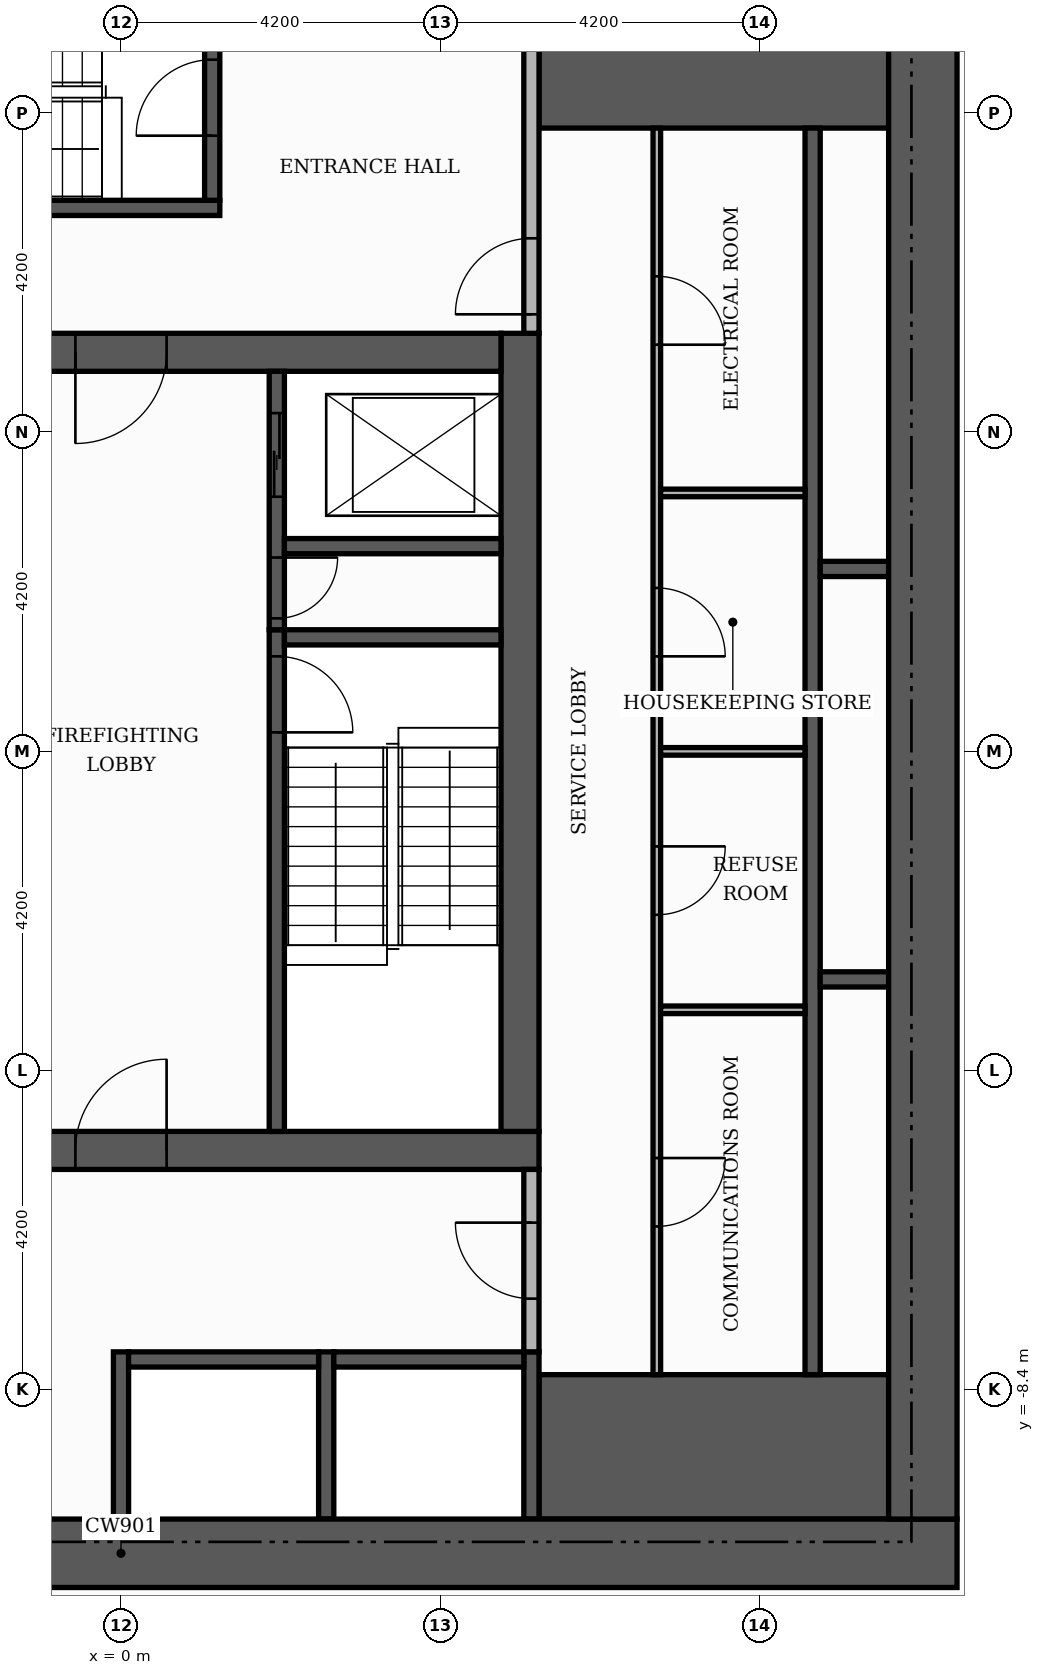
"""IFC4 building model, lengths in metres.
Left out: names, types, materials, properties, quantities, classifications, styles, units other than length and angle.
Written with IfcOpenShell. Run it as: python <this file> out.ifc"""

import sys

from ifc_helpers import new_model, si_unit, direction, frame, frame_2d, origin, place, context, subcontext, project, spatial, rectangle, extrude, element, fill, save


model = new_model("IFC4")
c1 = context("Model", 3, precision=1e-05, world=origin(), true_north=direction((0.0, 1.0)))
c2 = subcontext(c1, "Body", "Model", "MODEL_VIEW")
j1 = project(units=[si_unit("LENGTHUNIT", "METRE"), si_unit("PLANEANGLEUNIT", "RADIAN")], contexts=[c1])
p1 = place(None, origin())
s1 = spatial("IfcSite", under=j1, at=p1, CompositionType="ELEMENT")
p2 = place(p1, origin())
s2 = spatial("IfcBuilding", under=s1, at=p2, CompositionType="ELEMENT")
p3 = place(p2, frame((0.0, 0.0, 66.0)))
s3 = spatial("IfcBuildingStorey", under=s2, at=p3, CompositionType="ELEMENT", Elevation=66.0)
p4 = place(p3, frame((-5.5, -5.25, 0.0), z_axis=(0.0, 0.0, 1.0), x_axis=(1.0, 0.0, 0.0)))
e1 = element("IfcWall", 1, at=p4, inside=s3, PredefinedType="SHEAR", context=c2, shape_type="SweptSolid", body=[
    extrude(rectangle(XDim=11.0, YDim=0.5, at=frame_2d((5.5, 0.0))), origin(), (0.0, 0.0, 1.0), 3.48),
])
p5 = place(p4, frame((4.9, 0.0, 0.0)))
e2 = element("IfcOpeningElement", 2, at=p5, cuts=e1, PredefinedType="OPENING", context=c2, shape_type="SweptSolid", body=[
    extrude(rectangle(XDim=1.2, YDim=2.1, at=frame_2d((0.6, 1.05))), frame((0.0, 0.26, 0.0), z_axis=(0.0, -1.0, 0.0), x_axis=(1.0, 0.0, 0.0)), (0.0, 0.0, 1.0), 0.52),
])
p6 = place(p3, frame((5.25, -5.0, 0.0), z_axis=(0.0, 0.0, 1.0), x_axis=(0.0, 1.0, 0.0)))
e3 = element("IfcWall", 3, at=p6, inside=s3, PredefinedType="SHEAR", context=c2, shape_type="SweptSolid", body=[
    extrude(rectangle(XDim=10.5, YDim=0.5, at=frame_2d((5.25, 0.0))), origin(), (0.0, 0.0, 1.0), 3.48),
])
p7 = place(p3, frame((-5.0, 5.25, 0.0), z_axis=(0.0, 0.0, 1.0), x_axis=(1.0, 0.0, 0.0)))
e4 = element("IfcWall", 4, at=p7, inside=s3, PredefinedType="SHEAR", context=c2, shape_type="SweptSolid", body=[
    extrude(rectangle(XDim=10.0, YDim=0.5, at=frame_2d((5.0, 0.0))), origin(), (0.0, 0.0, 1.0), 3.48),
])
p8 = place(p7, frame((4.4, 0.0, 0.0)))
e5 = element("IfcOpeningElement", 5, at=p8, cuts=e4, PredefinedType="OPENING", context=c2, shape_type="SweptSolid", body=[
    extrude(rectangle(XDim=1.2, YDim=2.1, at=frame_2d((0.6, 1.05))), frame((0.0, 0.26, 0.0), z_axis=(0.0, -1.0, 0.0), x_axis=(1.0, 0.0, 0.0)), (0.0, 0.0, 1.0), 0.52),
])
for number, where, z_axis, x_axis in (
    (6, (5.5, -9.15, 0.0), (0.0, 0.0, 1.0), (1.0, 0.0, 0.0)),
    (7, (5.5, 9.15, 0.0), (0.0, 0.0, 1.0), (1.0, 0.0, 0.0)),
):
    element("IfcWall", number, at=place(p3, frame(where, z_axis=z_axis, x_axis=x_axis)), inside=s3, PredefinedType="SHEAR", context=c2, shape_type="SweptSolid", body=[
        extrude(rectangle(XDim=4.6, YDim=1.9, at=frame_2d((2.3, 0.0))), origin(), (0.0, 0.0, 1.0), 3.48),
    ])
p9 = place(p3, frame((2.05, -5.0, 0.0), z_axis=(0.0, 0.0, 1.0), x_axis=(0.0, 1.0, 0.0)))
e8 = element("IfcWall", 8, at=p9, inside=s3, PredefinedType="SHEAR", context=c2, shape_type="SweptSolid", body=[
    extrude(rectangle(XDim=6.6, YDim=0.2, at=frame_2d((3.3, 0.0))), origin(), (0.0, 0.0, 1.0), 3.48),
])
p10 = place(p9, frame((5.25, 0.0, 0.0)))
e9 = element("IfcOpeningElement", 9, at=p10, cuts=e8, PredefinedType="OPENING", context=c2, shape_type="SweptSolid", body=[
    extrude(rectangle(XDim=1.0, YDim=2.1, at=frame_2d((0.5, 1.05))), frame((0.0, 0.11, 0.0), z_axis=(0.0, -1.0, 0.0), x_axis=(1.0, 0.0, 0.0)), (0.0, 0.0, 1.0), 0.22),
])
p11 = place(p3, frame((2.15, 1.5, 0.0), z_axis=(0.0, 0.0, 1.0), x_axis=(1.0, 0.0, 0.0)))
e10 = element("IfcWall", 10, at=p11, inside=s3, PredefinedType="SHEAR", context=c2, shape_type="SweptSolid", body=[
    extrude(rectangle(XDim=2.85, YDim=0.2, at=frame_2d((1.425, 0.0))), origin(), (0.0, 0.0, 1.0), 3.48),
])
p12 = place(p3, frame((-5.5, 7.15, 0.0), z_axis=(0.0, 0.0, 1.0), x_axis=(1.0, 0.0, 0.0)))
e11 = element("IfcWall", 11, at=p12, inside=s3, PredefinedType="SHEAR", context=c2, shape_type="SweptSolid", body=[
    extrude(rectangle(XDim=6.8, YDim=0.2, at=frame_2d((3.4, 0.0))), origin(), (0.0, 0.0, 1.0), 3.48),
])
p13 = place(p3, frame((1.2, 7.25, 0.0), z_axis=(0.0, 0.0, 1.0), x_axis=(0.0, 1.0, 0.0)))
e12 = element("IfcWall", 12, at=p13, inside=s3, PredefinedType="SHEAR", context=c2, shape_type="SweptSolid", body=[
    extrude(rectangle(XDim=2.85, YDim=0.2, at=frame_2d((1.425, 0.0))), origin(), (0.0, 0.0, 1.0), 3.48),
])
p14 = place(p13, frame((0.85, 0.0, 0.0)))
e13 = element("IfcOpeningElement", 13, at=p14, cuts=e12, PredefinedType="OPENING", context=c2, shape_type="SweptSolid", body=[
    extrude(rectangle(XDim=1.0, YDim=2.1, at=frame_2d((0.5, 1.05))), frame((0.0, 0.11, 0.0), z_axis=(0.0, -1.0, 0.0), x_axis=(1.0, 0.0, 0.0)), (0.0, 0.0, 1.0), 0.22),
])
for number, where, z_axis, x_axis in (
    (14, (0.0, -10.1, 0.0), (0.0, 0.0, 1.0), (0.0, 1.0, 0.0)),
    (15, (2.7, -10.1, 0.0), (0.0, 0.0, 1.0), (0.0, 1.0, 0.0)),
    (16, (5.4, -10.1, 0.0), (0.0, 0.0, 1.0), (0.0, 1.0, 0.0)),
):
    element("IfcWall", number, at=place(p3, frame(where, z_axis=z_axis, x_axis=x_axis)), inside=s3, PredefinedType="SHEAR", context=c2, shape_type="SweptSolid", body=[
        extrude(rectangle(XDim=2.2, YDim=0.2, at=frame_2d((1.1, 0.0))), origin(), (0.0, 0.0, 1.0), 3.48),
    ])
p15 = place(p3, frame((9.1, -8.2, 0.0), z_axis=(0.0, 0.0, 1.0), x_axis=(0.0, 1.0, 0.0)))
e17 = element("IfcWall", 17, at=p15, inside=s3, PredefinedType="SHEAR", context=c2, shape_type="SweptSolid", body=[
    extrude(rectangle(XDim=16.4, YDim=0.2, at=frame_2d((8.2, 0.0))), origin(), (0.0, 0.0, 1.0), 3.48),
])
for number, where, z_axis, x_axis in (
    (18, (0.1, -8.0, 0.0), (0.0, 0.0, 1.0), (1.0, 0.0, 0.0)),
    (19, (2.8, -8.0, 0.0), (0.0, 0.0, 1.0), (1.0, 0.0, 0.0)),
):
    element("IfcWall", number, at=place(p3, frame(where, z_axis=z_axis, x_axis=x_axis)), inside=s3, PredefinedType="SHEAR", context=c2, shape_type="SweptSolid", body=[
        extrude(rectangle(XDim=2.5, YDim=0.2, at=frame_2d((1.25, 0.0))), origin(), (0.0, 0.0, 1.0), 3.48),
    ])
p16 = place(p3, frame((9.2, -3.0, 0.0), z_axis=(0.0, 0.0, 1.0), x_axis=(1.0, 0.0, 0.0)))
e20 = element("IfcWall", 20, at=p16, inside=s3, PredefinedType="SHEAR", context=c2, shape_type="SweptSolid", body=[
    extrude(rectangle(XDim=0.9, YDim=0.2, at=frame_2d((0.45, 0.0))), origin(), (0.0, 0.0, 1.0), 3.48),
])
p17 = place(p3, frame((2.05, 1.6, 0.0), z_axis=(0.0, 0.0, 1.0), x_axis=(0.0, 1.0, 0.0)))
e21 = element("IfcWall", 21, at=p17, inside=s3, PredefinedType="SHEAR", context=c2, shape_type="SweptSolid", body=[
    extrude(rectangle(XDim=3.4, YDim=0.2, at=frame_2d((1.7, 0.0))), origin(), (0.0, 0.0, 1.0), 3.48),
])
p18 = place(p17, frame((1.75, 0.0, 0.0)))
e22 = element("IfcOpeningElement", 22, at=p18, cuts=e21, PredefinedType="OPENING", context=c2, shape_type="SweptSolid", body=[
    extrude(rectangle(XDim=1.1, YDim=2.1, at=frame_2d((0.55, 1.05))), frame((0.0, 0.11, 0.0), z_axis=(0.0, -1.0, 0.0), x_axis=(1.0, 0.0, 0.0)), (0.0, 0.0, 1.0), 0.22),
])
p19 = place(p17, frame((0.15, 0.0, 0.0)))
e23 = element("IfcOpeningElement", 23, at=p19, cuts=e21, PredefinedType="OPENING", context=c2, shape_type="SweptSolid", body=[
    extrude(rectangle(XDim=0.8, YDim=2.1, at=frame_2d((0.4, 1.05))), frame((0.0, 0.11, 0.0), z_axis=(0.0, -1.0, 0.0), x_axis=(1.0, 0.0, 0.0)), (0.0, 0.0, 1.0), 0.22),
])
p20 = place(p3, frame((9.2, 2.4, 0.0), z_axis=(0.0, 0.0, 1.0), x_axis=(1.0, 0.0, 0.0)))
e24 = element("IfcWall", 24, at=p20, inside=s3, PredefinedType="SHEAR", context=c2, shape_type="SweptSolid", body=[
    extrude(rectangle(XDim=0.9, YDim=0.2, at=frame_2d((0.45, 0.0))), origin(), (0.0, 0.0, 1.0), 3.48),
])
p21 = place(p3, frame((2.15, 2.7, 0.0), z_axis=(0.0, 0.0, 1.0), x_axis=(1.0, 0.0, 0.0)))
e25 = element("IfcWall", 25, at=p21, inside=s3, PredefinedType="SHEAR", context=c2, shape_type="SweptSolid", body=[
    extrude(rectangle(XDim=2.85, YDim=0.2, at=frame_2d((1.425, 0.0))), origin(), (0.0, 0.0, 1.0), 3.48),
])
p22 = place(p3, frame((-11.0, -10.55, 0.0), z_axis=(0.0, 0.0, 1.0), x_axis=(1.0, 0.0, 0.0)))
e26 = element("IfcWall", 26, at=p22, inside=s3, PredefinedType="SHEAR", context=c2, shape_type="SweptSolid", body=[
    extrude(rectangle(XDim=22.0, YDim=0.9, at=frame_2d((11.0, 0.0))), origin(), (0.0, 0.0, 1.0), 3.48),
])
p23 = place(p22, frame((7.4, 0.0, 0.0)))
e27 = element("IfcOpeningElement", 27, at=p23, cuts=e26, PredefinedType="OPENING", context=c2, shape_type="SweptSolid", body=[
    extrude(rectangle(XDim=1.8, YDim=2.2, at=frame_2d((0.9, 1.1))), frame((0.0, 0.46, 0.0), z_axis=(0.0, -1.0, 0.0), x_axis=(1.0, 0.0, 0.0)), (0.0, 0.0, 1.0), 0.92),
])
p24 = place(p3, frame((10.55, -10.1, 0.0), z_axis=(0.0, 0.0, 1.0), x_axis=(0.0, 1.0, 0.0)))
e28 = element("IfcWall", 28, at=p24, inside=s3, PredefinedType="SHEAR", context=c2, shape_type="SweptSolid", body=[
    extrude(rectangle(XDim=20.2, YDim=0.9, at=frame_2d((10.1, 0.0))), origin(), (0.0, 0.0, 1.0), 3.48),
])
p25 = place(p3, frame((7.05, -8.2, 0.0), z_axis=(0.0, 0.0, 1.0), x_axis=(0.0, 1.0, 0.0)))
e29 = element("IfcWall", 29, at=p25, inside=s3, PredefinedType="PARTITIONING", context=c2, shape_type="SweptSolid", body=[
    extrude(rectangle(XDim=16.4, YDim=0.1, at=frame_2d((8.2, 0.0))), origin(), (0.0, 0.0, 1.0), 3.48),
])
p26 = place(p25, frame((1.95, 0.0, 0.0)))
e30 = element("IfcOpeningElement", 30, at=p26, cuts=e29, PredefinedType="OPENING", context=c2, shape_type="SweptSolid", body=[
    extrude(rectangle(XDim=0.9, YDim=2.1, at=frame_2d((0.45, 1.05))), frame((0.0, 0.06, 0.0), z_axis=(0.0, -1.0, 0.0), x_axis=(1.0, 0.0, 0.0)), (0.0, 0.0, 1.0), 0.12),
])
p27 = place(p25, frame((6.05, 0.0, 0.0)))
e31 = element("IfcOpeningElement", 31, at=p27, cuts=e29, PredefinedType="OPENING", context=c2, shape_type="SweptSolid", body=[
    extrude(rectangle(XDim=0.9, YDim=2.1, at=frame_2d((0.45, 1.05))), frame((0.0, 0.06, 0.0), z_axis=(0.0, -1.0, 0.0), x_axis=(1.0, 0.0, 0.0)), (0.0, 0.0, 1.0), 0.12),
])
p28 = place(p25, frame((9.45, 0.0, 0.0)))
e32 = element("IfcOpeningElement", 32, at=p28, cuts=e29, PredefinedType="OPENING", context=c2, shape_type="SweptSolid", body=[
    extrude(rectangle(XDim=0.9, YDim=2.1, at=frame_2d((0.45, 1.05))), frame((0.0, 0.06, 0.0), z_axis=(0.0, -1.0, 0.0), x_axis=(1.0, 0.0, 0.0)), (0.0, 0.0, 1.0), 0.12),
])
p29 = place(p25, frame((13.55, 0.0, 0.0)))
e33 = element("IfcOpeningElement", 33, at=p29, cuts=e29, PredefinedType="OPENING", context=c2, shape_type="SweptSolid", body=[
    extrude(rectangle(XDim=0.9, YDim=2.1, at=frame_2d((0.45, 1.05))), frame((0.0, 0.06, 0.0), z_axis=(0.0, -1.0, 0.0), x_axis=(1.0, 0.0, 0.0)), (0.0, 0.0, 1.0), 0.12),
])
p30 = place(p3, frame((5.4, -7.9, 0.0), z_axis=(0.0, 0.0, 1.0), x_axis=(0.0, 1.0, 0.0)))
e34 = element("IfcWall", 34, at=p30, inside=s3, PredefinedType="PARTITIONING", context=c2, shape_type="SweptSolid", body=[
    extrude(rectangle(XDim=2.4, YDim=0.2, at=frame_2d((1.2, 0.0))), origin(), (0.0, 0.0, 1.0), 3.48),
])
p31 = place(p30, frame((0.7, 0.0, 0.0)))
e35 = element("IfcOpeningElement", 35, at=p31, cuts=e34, PredefinedType="OPENING", context=c2, shape_type="SweptSolid", body=[
    extrude(rectangle(XDim=1.0, YDim=2.1, at=frame_2d((0.5, 1.05))), frame((0.0, 0.11, 0.0), z_axis=(0.0, -1.0, 0.0), x_axis=(1.0, 0.0, 0.0)), (0.0, 0.0, 1.0), 0.22),
])
for number, where, z_axis, x_axis in (
    (36, (7.1, -3.4, 0.0), (0.0, 0.0, 1.0), (1.0, 0.0, 0.0)),
    (37, (7.1, 0.0, 0.0), (0.0, 0.0, 1.0), (1.0, 0.0, 0.0)),
    (38, (7.1, 3.4, 0.0), (0.0, 0.0, 1.0), (1.0, 0.0, 0.0)),
):
    element("IfcWall", number, at=place(p3, frame(where, z_axis=z_axis, x_axis=x_axis)), inside=s3, PredefinedType="PARTITIONING", context=c2, shape_type="SweptSolid", body=[
        extrude(rectangle(XDim=1.9, YDim=0.1, at=frame_2d((0.95, 0.0))), origin(), (0.0, 0.0, 1.0), 3.48),
    ])
p32 = place(p3, frame((5.4, 5.5, 0.0), z_axis=(0.0, 0.0, 1.0), x_axis=(0.0, 1.0, 0.0)))
e39 = element("IfcWall", 39, at=p32, inside=s3, PredefinedType="PARTITIONING", context=c2, shape_type="SweptSolid", body=[
    extrude(rectangle(XDim=4.6, YDim=0.2, at=frame_2d((2.3, 0.0))), origin(), (0.0, 0.0, 1.0), 3.48),
])
p33 = place(p32, frame((0.25, 0.0, 0.0)))
e40 = element("IfcOpeningElement", 40, at=p33, cuts=e39, PredefinedType="OPENING", context=c2, shape_type="SweptSolid", body=[
    extrude(rectangle(XDim=1.0, YDim=2.1, at=frame_2d((0.5, 1.05))), frame((0.0, 0.11, 0.0), z_axis=(0.0, -1.0, 0.0), x_axis=(1.0, 0.0, 0.0)), (0.0, 0.0, 1.0), 0.22),
])
p34 = place(p18, origin())
e41 = element("IfcDoor", 41, at=p34, inside=s3, OperationType="SLIDING_TO_LEFT", PredefinedType="DOOR", context=c2, shape_type="SweptSolid", body=[
    extrude(rectangle(XDim=1.1, YDim=2.1, at=frame_2d((0.55, 1.05))), frame((0.0, 0.025, 0.0), z_axis=(0.0, -1.0, 0.0), x_axis=(1.0, 0.0, 0.0)), (0.0, 0.0, 1.0), 0.05),
])
fill(e22, e41)
p35 = place(p10, frame((1.0, 0.0, 0.0), z_axis=(0.0, 0.0, 1.0), x_axis=(-1.0, 0.0, 0.0)))
e42 = element("IfcDoor", 42, at=p35, inside=s3, OperationType="SINGLE_SWING_LEFT", PredefinedType="DOOR", context=c2, shape_type="SweptSolid", body=[
    extrude(rectangle(XDim=1.0, YDim=2.1, at=frame_2d((0.5, 1.05))), frame((0.0, 0.025, 0.0), z_axis=(0.0, -1.0, 0.0), x_axis=(1.0, 0.0, 0.0)), (0.0, 0.0, 1.0), 0.05),
])
fill(e9, e42)
p36 = place(p19, frame((0.8, 0.0, 0.0), z_axis=(0.0, 0.0, 1.0), x_axis=(-1.0, 0.0, 0.0)))
e43 = element("IfcDoor", 43, at=p36, inside=s3, OperationType="SINGLE_SWING_RIGHT", PredefinedType="DOOR", context=c2, shape_type="SweptSolid", body=[
    extrude(rectangle(XDim=0.8, YDim=2.1, at=frame_2d((0.4, 1.05))), frame((0.0, 0.025, 0.0), z_axis=(0.0, -1.0, 0.0), x_axis=(1.0, 0.0, 0.0)), (0.0, 0.0, 1.0), 0.05),
])
fill(e23, e43)
p37 = place(p8, frame((1.2, 0.0, 0.0), z_axis=(0.0, 0.0, 1.0), x_axis=(-1.0, 0.0, 0.0)))
e44 = element("IfcDoor", 44, at=p37, inside=s3, OperationType="SINGLE_SWING_LEFT", PredefinedType="DOOR", context=c2, shape_type="SweptSolid", body=[
    extrude(rectangle(XDim=1.2, YDim=2.1, at=frame_2d((0.6, 1.05))), frame((0.0, 0.025, 0.0), z_axis=(0.0, -1.0, 0.0), x_axis=(1.0, 0.0, 0.0)), (0.0, 0.0, 1.0), 0.05),
])
fill(e5, e44)
p38 = place(p5, origin())
e45 = element("IfcDoor", 45, at=p38, inside=s3, OperationType="SINGLE_SWING_RIGHT", PredefinedType="DOOR", context=c2, shape_type="SweptSolid", body=[
    extrude(rectangle(XDim=1.2, YDim=2.1, at=frame_2d((0.6, 1.05))), frame((0.0, 0.025, 0.0), z_axis=(0.0, -1.0, 0.0), x_axis=(1.0, 0.0, 0.0)), (0.0, 0.0, 1.0), 0.05),
])
fill(e2, e45)
p39 = place(p14, origin())
e46 = element("IfcDoor", 46, at=p39, inside=s3, OperationType="SINGLE_SWING_LEFT", PredefinedType="DOOR", context=c2, shape_type="SweptSolid", body=[
    extrude(rectangle(XDim=1.0, YDim=2.1, at=frame_2d((0.5, 1.05))), frame((0.0, 0.025, 0.0), z_axis=(0.0, -1.0, 0.0), x_axis=(1.0, 0.0, 0.0)), (0.0, 0.0, 1.0), 0.05),
])
fill(e13, e46)
p40 = place(p33, origin())
e47 = element("IfcDoor", 47, at=p40, inside=s3, OperationType="SINGLE_SWING_LEFT", PredefinedType="DOOR", context=c2, shape_type="SweptSolid", body=[
    extrude(rectangle(XDim=1.0, YDim=2.1, at=frame_2d((0.5, 1.05))), frame((0.0, 0.025, 0.0), z_axis=(0.0, -1.0, 0.0), x_axis=(1.0, 0.0, 0.0)), (0.0, 0.0, 1.0), 0.05),
])
fill(e40, e47)
p41 = place(p31, origin())
e48 = element("IfcDoor", 48, at=p41, inside=s3, OperationType="SINGLE_SWING_RIGHT", PredefinedType="DOOR", context=c2, shape_type="SweptSolid", body=[
    extrude(rectangle(XDim=1.0, YDim=2.1, at=frame_2d((0.5, 1.05))), frame((0.0, 0.025, 0.0), z_axis=(0.0, -1.0, 0.0), x_axis=(1.0, 0.0, 0.0)), (0.0, 0.0, 1.0), 0.05),
])
fill(e35, e48)
p42 = place(p26, frame((0.9, 0.0, 0.0), z_axis=(0.0, 0.0, 1.0), x_axis=(-1.0, 0.0, 0.0)))
e49 = element("IfcDoor", 49, at=p42, inside=s3, OperationType="SINGLE_SWING_RIGHT", PredefinedType="DOOR", context=c2, shape_type="SweptSolid", body=[
    extrude(rectangle(XDim=0.9, YDim=2.1, at=frame_2d((0.45, 1.05))), frame((0.0, 0.025, 0.0), z_axis=(0.0, -1.0, 0.0), x_axis=(1.0, 0.0, 0.0)), (0.0, 0.0, 1.0), 0.05),
])
fill(e30, e49)
p43 = place(p27, frame((0.9, 0.0, 0.0), z_axis=(0.0, 0.0, 1.0), x_axis=(-1.0, 0.0, 0.0)))
e50 = element("IfcDoor", 50, at=p43, inside=s3, OperationType="SINGLE_SWING_RIGHT", PredefinedType="DOOR", context=c2, shape_type="SweptSolid", body=[
    extrude(rectangle(XDim=0.9, YDim=2.1, at=frame_2d((0.45, 1.05))), frame((0.0, 0.025, 0.0), z_axis=(0.0, -1.0, 0.0), x_axis=(1.0, 0.0, 0.0)), (0.0, 0.0, 1.0), 0.05),
])
fill(e31, e50)
p44 = place(p28, frame((0.9, 0.0, 0.0), z_axis=(0.0, 0.0, 1.0), x_axis=(-1.0, 0.0, 0.0)))
e51 = element("IfcDoor", 51, at=p44, inside=s3, OperationType="SINGLE_SWING_LEFT", PredefinedType="DOOR", context=c2, shape_type="SweptSolid", body=[
    extrude(rectangle(XDim=0.9, YDim=2.1, at=frame_2d((0.45, 1.05))), frame((0.0, 0.025, 0.0), z_axis=(0.0, -1.0, 0.0), x_axis=(1.0, 0.0, 0.0)), (0.0, 0.0, 1.0), 0.05),
])
fill(e32, e51)
p45 = place(p29, frame((0.9, 0.0, 0.0), z_axis=(0.0, 0.0, 1.0), x_axis=(-1.0, 0.0, 0.0)))
e52 = element("IfcDoor", 52, at=p45, inside=s3, OperationType="SINGLE_SWING_LEFT", PredefinedType="DOOR", context=c2, shape_type="SweptSolid", body=[
    extrude(rectangle(XDim=0.9, YDim=2.1, at=frame_2d((0.45, 1.05))), frame((0.0, 0.025, 0.0), z_axis=(0.0, -1.0, 0.0), x_axis=(1.0, 0.0, 0.0)), (0.0, 0.0, 1.0), 0.05),
])
fill(e33, e52)
save(model, sys.argv[1])
